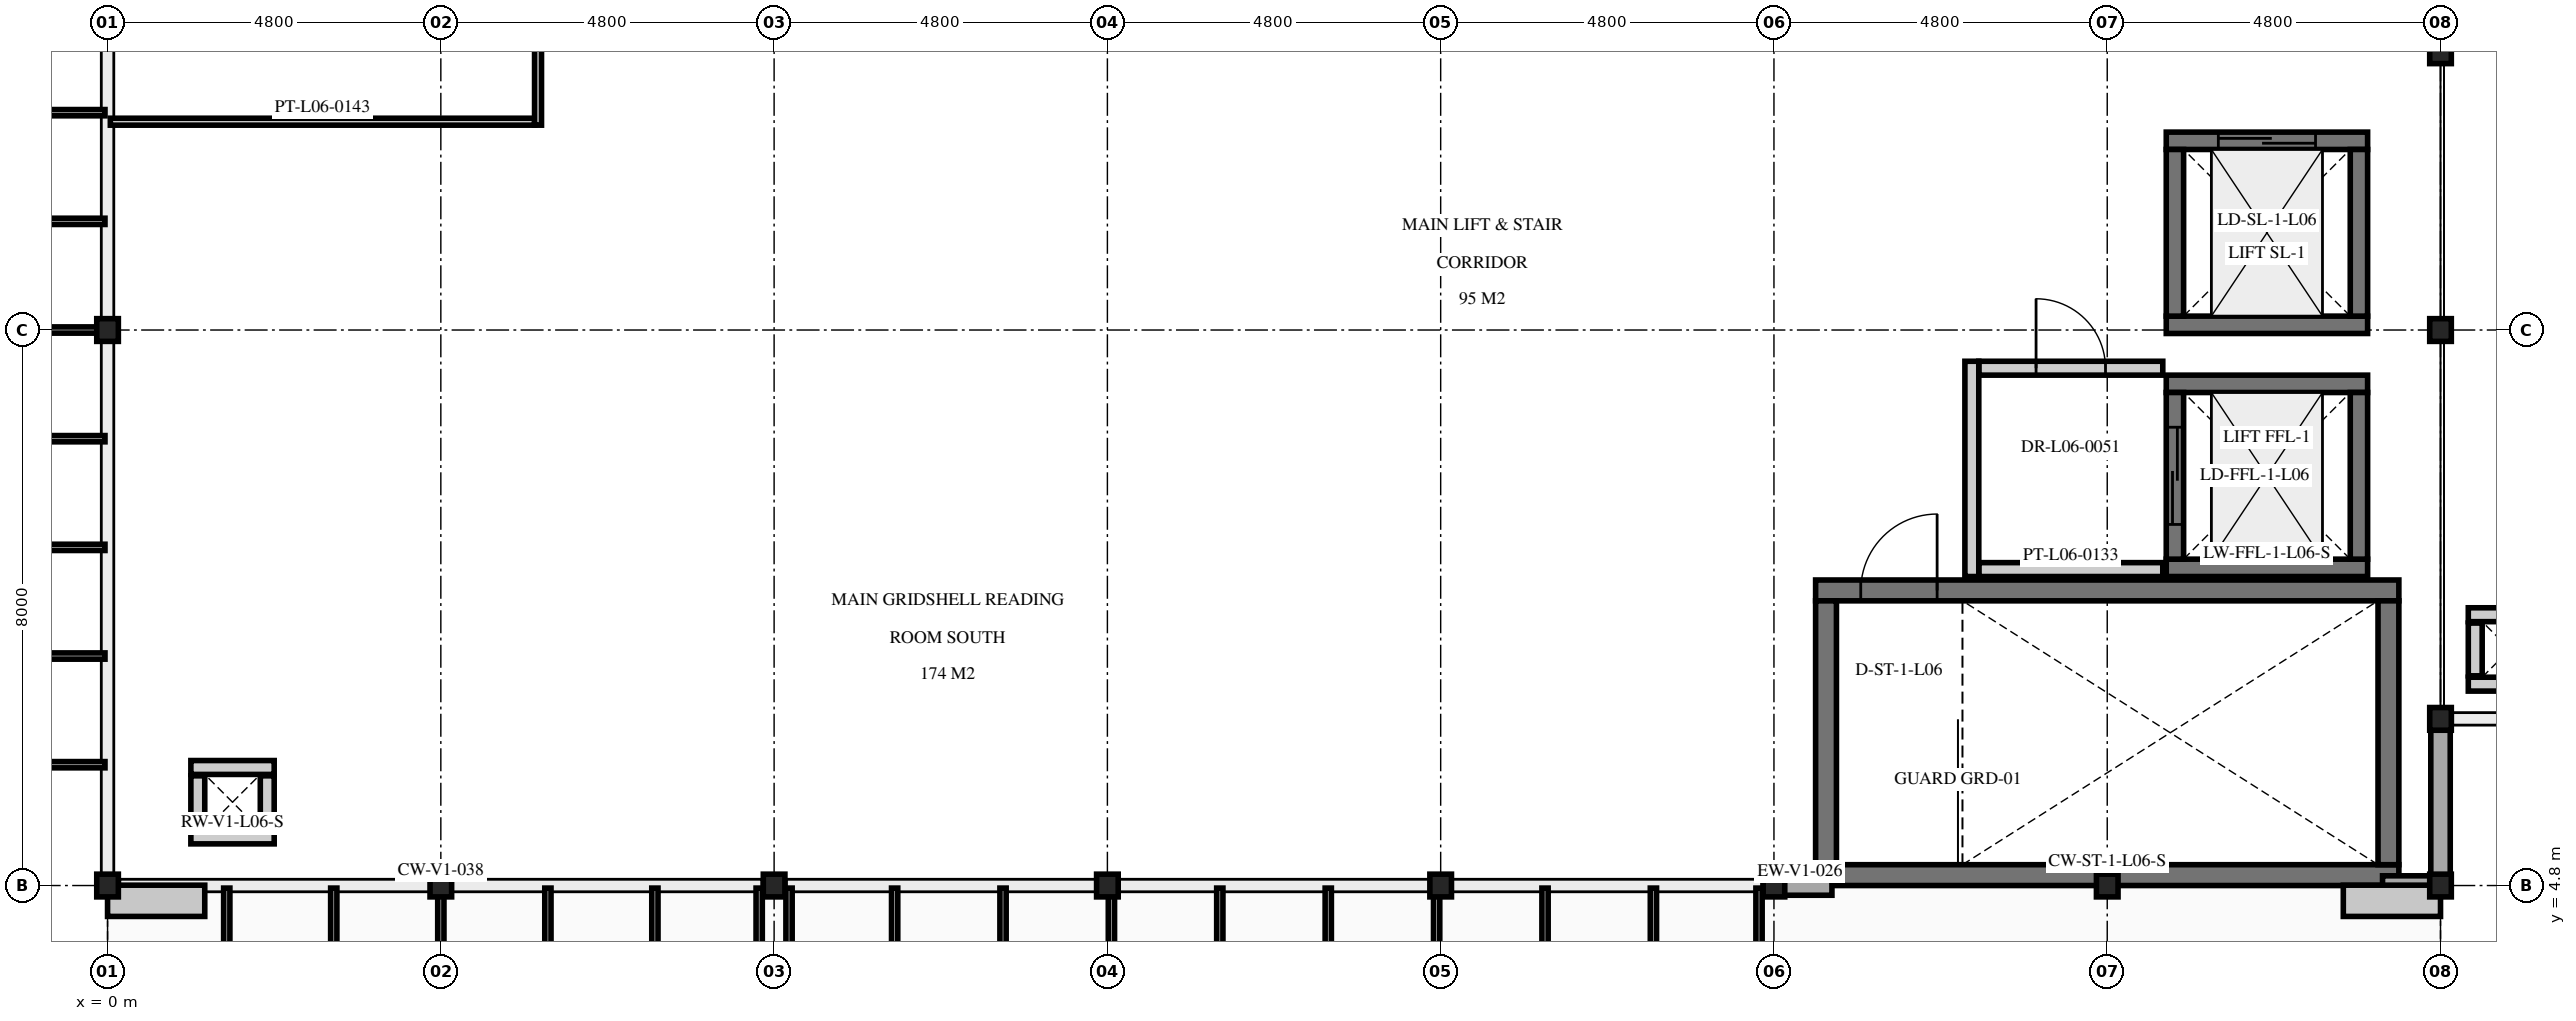
"""IFC4 building model, lengths in metres.
Left out: names, types, materials, properties, quantities, classifications, styles, units other than length and angle.
Written with IfcOpenShell. Run it as: python <this file> out.ifc"""

import sys

from ifc_helpers import new_model, si_unit, direction, frame, frame_2d, origin, origin_2d, place, context, subcontext, project, spatial, rectangle, i_section, extrude, element, fill, save


model = new_model("IFC4")
c1 = context("Model", 3, precision=1e-05, world=origin(), true_north=direction((0.0, 1.0)))
c2 = subcontext(c1, "Body", "Model", "MODEL_VIEW")
j1 = project(units=[si_unit("LENGTHUNIT", "METRE"), si_unit("PLANEANGLEUNIT", "RADIAN")], contexts=[c1])
p1 = place(None, origin())
s1 = spatial("IfcSite", under=j1, at=p1, CompositionType="ELEMENT")
p2 = place(p1, origin())
s2 = spatial("IfcBuilding", under=s1, at=p2, CompositionType="ELEMENT")
p3 = place(p2, frame((0.0, 0.0, 27.6)))
s3 = spatial("IfcBuildingStorey", under=s2, at=p3, CompositionType="ELEMENT", Elevation=27.6)
for number, where, z_axis, x_axis in (
    (1, (0.0, 4.8, 0.0), (0.0, 0.0, 1.0), (1.0, 0.0, 0.0)),
    (2, (4.8, 4.8, 0.0), (0.0, 0.0, 1.0), (1.0, 0.0, 0.0)),
    (3, (9.6, 4.8, 0.0), (0.0, 0.0, 1.0), (1.0, 0.0, 0.0)),
    (4, (14.4, 4.8, 0.0), (0.0, 0.0, 1.0), (1.0, 0.0, 0.0)),
    (5, (19.2, 4.8, 0.0), (0.0, 0.0, 1.0), (1.0, 0.0, 0.0)),
    (6, (24.0, 4.8, 0.0), (0.0, 0.0, 1.0), (1.0, 0.0, 0.0)),
    (7, (28.8, 4.8, 0.0), (0.0, 0.0, 1.0), (1.0, 0.0, 0.0)),
    (8, (33.6, 4.8, 0.0), (0.0, 0.0, 1.0), (1.0, 0.0, 0.0)),
    (9, (0.0, 12.8, 0.0), (0.0, 0.0, 1.0), (1.0, 0.0, 0.0)),
    (10, (33.6, 7.2, 0.0), (0.0, 0.0, 1.0), (1.0, 0.0, 0.0)),
    (11, (33.6, 12.8, 0.0), (0.0, 0.0, 1.0), (1.0, 0.0, 0.0)),
    (12, (33.6, 16.8, 0.0), (0.0, 0.0, 1.0), (1.0, 0.0, 0.0)),
):
    element("IfcColumn", number, at=place(p3, frame(where, z_axis=z_axis, x_axis=x_axis)), inside=s3, PredefinedType="COLUMN", context=c2, shape_type="SweptSolid", body=[
        extrude(i_section(OverallWidth=0.311, OverallDepth=0.327, WebThickness=0.016, FlangeThickness=0.025, at=origin_2d()), origin(), (0.0, 0.0, 1.0), 3.6),
    ])
p4 = place(p3, frame((33.0, 4.95, 0.0), z_axis=(0.0, 0.0, 1.0), x_axis=(-1.0, 0.0, 0.0)))
e13 = element("IfcWall", 13, at=p4, inside=s3, PredefinedType="SHEAR", context=c2, shape_type="SweptSolid", body=[
    extrude(rectangle(XDim=8.4, YDim=0.3, at=frame_2d((4.2, 0.0))), origin(), (0.0, 0.0, 1.0), 4.015),
])
p5 = place(p3, frame((24.6, 9.05, 0.0), z_axis=(0.0, 0.0, 1.0), x_axis=(1.0, 0.0, 0.0)))
e14 = element("IfcWall", 14, at=p5, inside=s3, PredefinedType="SHEAR", context=c2, shape_type="SweptSolid", body=[
    extrude(rectangle(XDim=8.4, YDim=0.3, at=frame_2d((4.2, 0.0))), origin(), (0.0, 0.0, 1.0), 4.015),
])
p6 = place(p5, frame((0.65, 0.0, 0.0)))
e15 = element("IfcOpeningElement", 15, at=p6, cuts=e14, PredefinedType="OPENING", context=c2, shape_type="SweptSolid", body=[
    extrude(rectangle(XDim=1.1, YDim=2.2, at=frame_2d((0.55, 1.1))), frame((0.0, 0.16, 0.0), z_axis=(0.0, -1.0, 0.0), x_axis=(1.0, 0.0, 0.0)), (0.0, 0.0, 1.0), 0.32),
])
for number, where, z_axis, x_axis in (
    (16, (24.75, 5.1, 0.0), (0.0, 0.0, 1.0), (0.0, 1.0, 0.0)),
    (17, (32.85, 8.9, 0.0), (0.0, 0.0, 1.0), (0.0, -1.0, 0.0)),
):
    element("IfcWall", number, at=place(p3, frame(where, z_axis=z_axis, x_axis=x_axis)), inside=s3, PredefinedType="SHEAR", context=c2, shape_type="SweptSolid", body=[
        extrude(rectangle(XDim=3.8, YDim=0.3, at=frame_2d((1.9, 0.0))), origin(), (0.0, 0.0, 1.0), 4.015),
    ])
for number, where, z_axis, x_axis in (
    (18, (32.55, 9.375, 0.0), (0.0, 0.0, 1.0), (-1.0, 0.0, 0.0)),
    (19, (29.65, 12.025, 0.0), (0.0, 0.0, 1.0), (1.0, 0.0, 0.0)),
):
    element("IfcWall", number, at=place(p3, frame(where, z_axis=z_axis, x_axis=x_axis)), inside=s3, PredefinedType="SHEAR", context=c2, shape_type="SweptSolid", body=[
        extrude(rectangle(XDim=2.9, YDim=0.25, at=frame_2d((1.45, 0.0))), origin(), (0.0, 0.0, 1.0), 4.015),
    ])
p7 = place(p3, frame((29.775, 9.5, 0.0), z_axis=(0.0, 0.0, 1.0), x_axis=(0.0, 1.0, 0.0)))
e20 = element("IfcWall", 20, at=p7, inside=s3, PredefinedType="SHEAR", context=c2, shape_type="SweptSolid", body=[
    extrude(rectangle(XDim=2.4, YDim=0.25, at=frame_2d((1.2, 0.0))), origin(), (0.0, 0.0, 1.0), 4.015),
])
p8 = place(p7, frame((0.5, 0.0, 0.0)))
e21 = element("IfcOpeningElement", 21, at=p8, cuts=e20, PredefinedType="OPENING", context=c2, shape_type="SweptSolid", body=[
    extrude(rectangle(XDim=1.4, YDim=2.2, at=frame_2d((0.7, 1.1))), frame((0.0, 0.135, 0.0), z_axis=(0.0, -1.0, 0.0), x_axis=(1.0, 0.0, 0.0)), (0.0, 0.0, 1.0), 0.27),
])
p9 = place(p3, frame((32.425, 11.9, 0.0), z_axis=(0.0, 0.0, 1.0), x_axis=(0.0, -1.0, 0.0)))
e22 = element("IfcWall", 22, at=p9, inside=s3, PredefinedType="SHEAR", context=c2, shape_type="SweptSolid", body=[
    extrude(rectangle(XDim=2.4, YDim=0.25, at=frame_2d((1.2, 0.0))), origin(), (0.0, 0.0, 1.0), 4.015),
])
p10 = place(p3, frame((32.55, 12.875, 0.0), z_axis=(0.0, 0.0, 1.0), x_axis=(-1.0, 0.0, 0.0)))
e23 = element("IfcWall", 23, at=p10, inside=s3, PredefinedType="SHEAR", context=c2, shape_type="SweptSolid", body=[
    extrude(rectangle(XDim=2.9, YDim=0.25, at=frame_2d((1.45, 0.0))), origin(), (0.0, 0.0, 1.0), 4.015),
])
p11 = place(p3, frame((29.65, 15.525, 0.0), z_axis=(0.0, 0.0, 1.0), x_axis=(1.0, 0.0, 0.0)))
e24 = element("IfcWall", 24, at=p11, inside=s3, PredefinedType="SHEAR", context=c2, shape_type="SweptSolid", body=[
    extrude(rectangle(XDim=2.9, YDim=0.25, at=frame_2d((1.45, 0.0))), origin(), (0.0, 0.0, 1.0), 4.015),
])
p12 = place(p11, frame((0.75, 0.0, 0.0)))
e25 = element("IfcOpeningElement", 25, at=p12, cuts=e24, PredefinedType="OPENING", context=c2, shape_type="SweptSolid", body=[
    extrude(rectangle(XDim=1.4, YDim=2.2, at=frame_2d((0.7, 1.1))), frame((0.0, 0.135, 0.0), z_axis=(0.0, -1.0, 0.0), x_axis=(1.0, 0.0, 0.0)), (0.0, 0.0, 1.0), 0.27),
])
for number, where, z_axis, x_axis in (
    (26, (29.775, 13.0, 0.0), (0.0, 0.0, 1.0), (0.0, 1.0, 0.0)),
    (27, (32.425, 15.4, 0.0), (0.0, 0.0, 1.0), (0.0, -1.0, 0.0)),
):
    element("IfcWall", number, at=place(p3, frame(where, z_axis=z_axis, x_axis=x_axis)), inside=s3, PredefinedType="SHEAR", context=c2, shape_type="SweptSolid", body=[
        extrude(rectangle(XDim=2.4, YDim=0.25, at=frame_2d((1.2, 0.0))), origin(), (0.0, 0.0, 1.0), 4.015),
    ])
for number, where, z_axis, x_axis in (
    (28, (2.4, 5.5, 0.0), (0.0, 0.0, 1.0), (-1.0, 0.0, 0.0)),
    (29, (1.2, 6.5, 0.0), (0.0, 0.0, 1.0), (1.0, 0.0, 0.0)),
):
    element("IfcWall", number, at=place(p3, frame(where, z_axis=z_axis, x_axis=x_axis)), inside=s3, PredefinedType="PARTITIONING", context=c2, shape_type="SweptSolid", body=[
        extrude(rectangle(XDim=1.2, YDim=0.2, at=frame_2d((0.6, 0.0))), origin(), (0.0, 0.0, 1.0), 3.515),
    ])
for number, where, z_axis, x_axis in (
    (30, (1.3, 5.62, 0.0), (0.0, 0.0, 1.0), (0.0, 1.0, 0.0)),
    (31, (2.3, 6.38, 0.0), (0.0, 0.0, 1.0), (0.0, -1.0, 0.0)),
):
    element("IfcWall", number, at=place(p3, frame(where, z_axis=z_axis, x_axis=x_axis)), inside=s3, PredefinedType="PARTITIONING", context=c2, shape_type="SweptSolid", body=[
        extrude(rectangle(XDim=0.76, YDim=0.2, at=frame_2d((0.38, 0.0))), origin(), (0.0, 0.0, 1.0), 3.515),
    ])
for number, where, z_axis, x_axis in (
    (32, (35.2, 7.7, 0.0), (0.0, 0.0, 1.0), (-1.0, 0.0, 0.0)),
    (33, (34.0, 8.7, 0.0), (0.0, 0.0, 1.0), (1.0, 0.0, 0.0)),
):
    element("IfcWall", number, at=place(p3, frame(where, z_axis=z_axis, x_axis=x_axis)), inside=s3, PredefinedType="PARTITIONING", context=c2, shape_type="SweptSolid", body=[
        extrude(rectangle(XDim=1.2, YDim=0.2, at=frame_2d((0.6, 0.0))), origin(), (0.0, 0.0, 1.0), 3.455),
    ])
p13 = place(p3, frame((34.1, 7.82, 0.0), z_axis=(0.0, 0.0, 1.0), x_axis=(0.0, 1.0, 0.0)))
e34 = element("IfcWall", 34, at=p13, inside=s3, PredefinedType="PARTITIONING", context=c2, shape_type="SweptSolid", body=[
    extrude(rectangle(XDim=0.76, YDim=0.2, at=frame_2d((0.38, 0.0))), origin(), (0.0, 0.0, 1.0), 3.455),
])
p14 = place(p3, frame((24.835, 4.8, 0.0), z_axis=(0.0, 0.0, 1.0), x_axis=(-1.0, 0.0, 0.0)))
e35 = element("IfcWall", 35, at=p14, inside=s3, PredefinedType="SOLIDWALL", context=c2, shape_type="SweptSolid", body=[
    extrude(rectangle(XDim=0.92, YDim=0.28, at=frame_2d((0.46, 0.0))), origin(), (0.0, 0.0, 1.0), 3.575),
])
p15 = place(p3, frame((33.685, 4.8, 0.0), z_axis=(0.0, 0.0, 1.0), x_axis=(-1.0, 0.0, 0.0)))
e36 = element("IfcWall", 36, at=p15, inside=s3, PredefinedType="SOLIDWALL", context=c2, shape_type="SweptSolid", body=[
    extrude(rectangle(XDim=0.92, YDim=0.28, at=frame_2d((0.46, 0.0))), origin(), (0.0, 0.0, 1.0), 3.575),
])
p16 = place(p3, frame((33.6, 7.285, 0.0), z_axis=(0.0, 0.0, 1.0), x_axis=(0.0, -1.0, 0.0)))
e37 = element("IfcWall", 37, at=p16, inside=s3, PredefinedType="SOLIDWALL", context=c2, shape_type="SweptSolid", body=[
    extrude(rectangle(XDim=2.57, YDim=0.28, at=frame_2d((1.285, 0.0))), origin(), (0.0, 0.0, 1.0), 3.185),
])
p17 = place(p3, frame((26.95, 9.35, 0.0), z_axis=(0.0, 0.0, 1.0), x_axis=(1.0, 0.0, 0.0)))
e38 = element("IfcWall", 38, at=p17, inside=s3, PredefinedType="PARTITIONING", context=c2, shape_type="SweptSolid", body=[
    extrude(rectangle(XDim=2.65, YDim=0.2, at=frame_2d((1.325, 0.0))), origin(), (0.0, 0.0, 1.0), 4.0),
])
p18 = place(p3, frame((26.95, 12.25, 0.0), z_axis=(0.0, 0.0, 1.0), x_axis=(1.0, 0.0, 0.0)))
e39 = element("IfcWall", 39, at=p18, inside=s3, PredefinedType="PARTITIONING", context=c2, shape_type="SweptSolid", body=[
    extrude(rectangle(XDim=2.65, YDim=0.2, at=frame_2d((1.325, 0.0))), origin(), (0.0, 0.0, 1.0), 4.0),
])
p19 = place(p18, frame((0.825, 0.0, 0.0)))
e40 = element("IfcOpeningElement", 40, at=p19, cuts=e39, PredefinedType="OPENING", context=c2, shape_type="SweptSolid", body=[
    extrude(rectangle(XDim=1.0, YDim=2.2, at=frame_2d((0.5, 1.1))), frame((0.0, 0.11, 0.0), z_axis=(0.0, -1.0, 0.0), x_axis=(1.0, 0.0, 0.0)), (0.0, 0.0, 1.0), 0.22),
])
p20 = place(p3, frame((26.85, 9.25, 0.0), z_axis=(0.0, 0.0, 1.0), x_axis=(0.0, 1.0, 0.0)))
e41 = element("IfcWall", 41, at=p20, inside=s3, PredefinedType="PARTITIONING", context=c2, shape_type="SweptSolid", body=[
    extrude(rectangle(XDim=3.1, YDim=0.2, at=frame_2d((1.55, 0.0))), origin(), (0.0, 0.0, 1.0), 4.0),
])
p21 = place(p3, frame((0.04, 15.8, 0.0), z_axis=(0.0, 0.0, 1.0), x_axis=(1.0, 0.0, 0.0)))
e42 = element("IfcWall", 42, at=p21, inside=s3, PredefinedType="MOVABLE", context=c2, shape_type="SweptSolid", body=[
    extrude(rectangle(XDim=6.11, YDim=0.1, at=frame_2d((3.055, 0.0))), origin(), (0.0, 0.0, 1.0), 3.575),
])
p22 = place(p3, frame((6.2, 15.75, 0.0), z_axis=(0.0, 0.0, 1.0), x_axis=(0.0, 1.0, 0.0)))
e43 = element("IfcWall", 43, at=p22, inside=s3, PredefinedType="MOVABLE", context=c2, shape_type="SweptSolid", body=[
    extrude(rectangle(XDim=14.4, YDim=0.1, at=frame_2d((7.2, 0.0))), origin(), (0.0, 0.0, 1.0), 4.0),
])
p23 = place(p22, frame((6.4, 0.0, 0.0)))
e44 = element("IfcOpeningElement", 44, at=p23, cuts=e43, PredefinedType="OPENING", context=c2, shape_type="SweptSolid", body=[
    extrude(rectangle(XDim=1.6, YDim=2.25, at=frame_2d((0.8, 1.125))), frame((0.0, 0.06, 0.0), z_axis=(0.0, -1.0, 0.0), x_axis=(1.0, 0.0, 0.0)), (0.0, 0.0, 1.0), 0.12),
])
p24 = place(p6, origin())
e45 = element("IfcDoor", 45, at=p24, inside=s3, OperationType="SINGLE_SWING_RIGHT", PredefinedType="DOOR", context=c2, shape_type="SweptSolid", body=[
    extrude(rectangle(XDim=1.1, YDim=2.2, at=frame_2d((0.55, 1.1))), frame((0.0, 0.025, 0.0), z_axis=(0.0, -1.0, 0.0), x_axis=(1.0, 0.0, 0.0)), (0.0, 0.0, 1.0), 0.05),
])
fill(e15, e45)
p25 = place(p8, origin())
e46 = element("IfcDoor", 46, at=p25, inside=s3, OperationType="DOUBLE_DOOR_SLIDING", PredefinedType="DOOR", context=c2, shape_type="SweptSolid", body=[
    extrude(rectangle(XDim=1.4, YDim=2.2, at=frame_2d((0.7, 1.1))), frame((0.0, 0.025, 0.0), z_axis=(0.0, -1.0, 0.0), x_axis=(1.0, 0.0, 0.0)), (0.0, 0.0, 1.0), 0.05),
])
fill(e21, e46)
p26 = place(p12, origin())
e47 = element("IfcDoor", 47, at=p26, inside=s3, OperationType="DOUBLE_DOOR_SLIDING", PredefinedType="DOOR", context=c2, shape_type="SweptSolid", body=[
    extrude(rectangle(XDim=1.4, YDim=2.2, at=frame_2d((0.7, 1.1))), frame((0.0, 0.025, 0.0), z_axis=(0.0, -1.0, 0.0), x_axis=(1.0, 0.0, 0.0)), (0.0, 0.0, 1.0), 0.05),
])
fill(e25, e47)
p27 = place(p19, origin())
e48 = element("IfcDoor", 48, at=p27, inside=s3, OperationType="SINGLE_SWING_LEFT", PredefinedType="DOOR", context=c2, shape_type="SweptSolid", body=[
    extrude(rectangle(XDim=1.0, YDim=2.2, at=frame_2d((0.5, 1.1))), frame((0.0, 0.025, 0.0), z_axis=(0.0, -1.0, 0.0), x_axis=(1.0, 0.0, 0.0)), (0.0, 0.0, 1.0), 0.05),
])
fill(e40, e48)
save(model, sys.argv[1])
